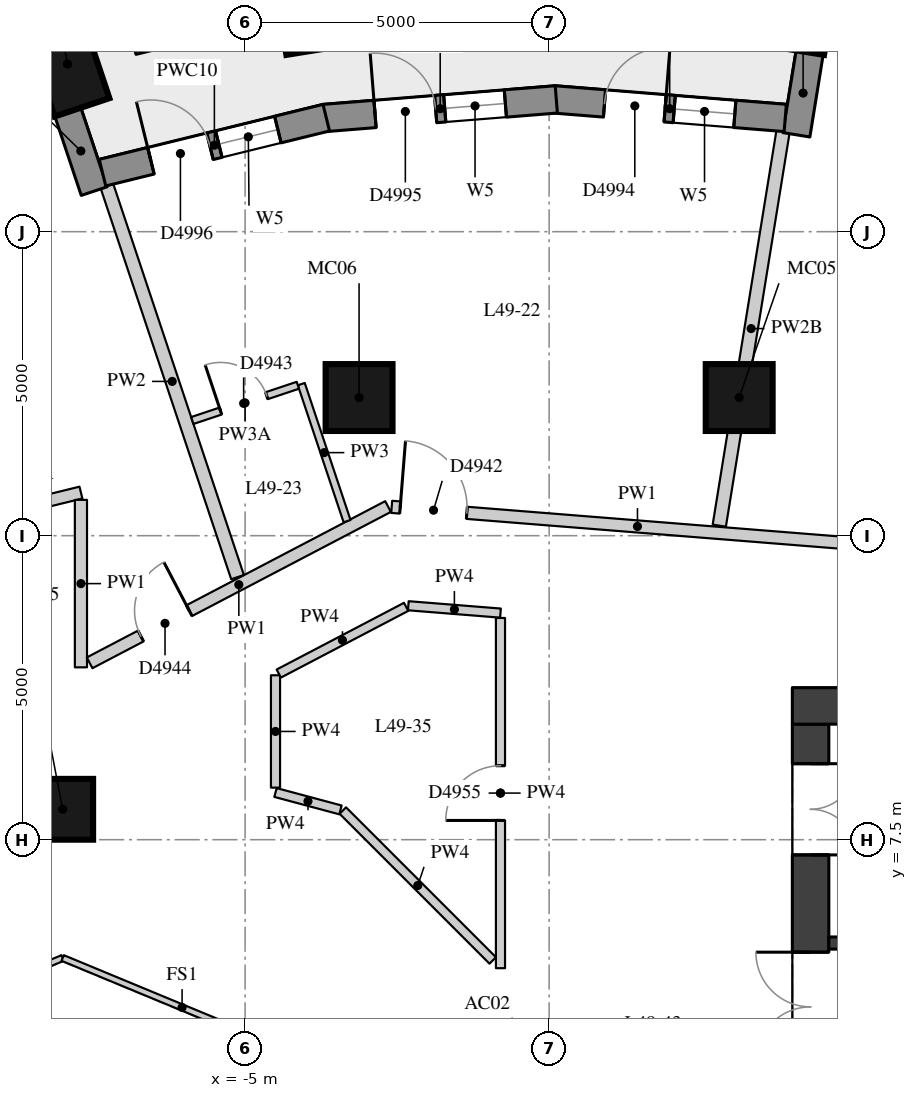
"""IFC4 building model, lengths in metres.
Left out: names, types, materials, properties, quantities, classifications, styles, units other than length and angle.
Written with IfcOpenShell. Run it as: python <this file> out.ifc"""

import sys

from ifc_helpers import new_model, si_unit, direction, frame, frame_2d, origin, origin_2d, place, context, subcontext, project, spatial, rectangle, extrude, element, fill, save


model = new_model("IFC4")
c1 = context("Model", 3, precision=1e-05, world=origin(), true_north=direction((0.0, 1.0)))
c2 = subcontext(c1, "Body", "Model", "MODEL_VIEW")
j1 = project(units=[si_unit("LENGTHUNIT", "METRE"), si_unit("PLANEANGLEUNIT", "RADIAN")], contexts=[c1])
p1 = place(None, origin())
s1 = spatial("IfcSite", under=j1, at=p1, CompositionType="ELEMENT")
p2 = place(p1, origin())
s2 = spatial("IfcBuilding", under=s1, at=p2, CompositionType="ELEMENT")
p3 = place(p2, frame((0.0, 0.0, 174.8)))
s3 = spatial("IfcBuildingStorey", under=s2, at=p3, CompositionType="ELEMENT", Elevation=174.8)
for number, where, z_axis, x_axis in (
    (1, (4.172, 21.224, 0.0), (0.0, 0.0, 1.0), (0.16, 0.987, 0.0)),
    (2, (-3.972, 21.224, 0.0), (0.0, 0.0, 1.0), (-0.16, 0.987, 0.0)),
    (3, (-7.92, 20.256, 0.0), (0.0, 0.0, 1.0), (-0.317, 0.949, 0.0)),
):
    element("IfcColumn", number, at=place(p3, frame(where, z_axis=z_axis, x_axis=x_axis)), inside=s3, PredefinedType="COLUMN", context=c2, shape_type="SweptSolid", body=[
        extrude(rectangle(XDim=1.5, YDim=0.95, at=origin_2d()), origin(), (0.0, 0.0, 1.0), 3.3),
    ])
p4 = place(p3, frame((-8.0, 8.0, 0.0), z_axis=(0.0, 0.0, 1.0), x_axis=(1.0, 0.0, 0.0)))
e4 = element("IfcColumn", 4, at=p4, inside=s3, PredefinedType="COLUMN", context=c2, shape_type="SweptSolid", body=[
    extrude(rectangle(XDim=1.0, YDim=1.0, at=origin_2d()), origin(), (0.0, 0.0, 1.0), 3.3),
])
for number, where, z_axis, x_axis in (
    (5, (3.126, 14.772, 0.0), (0.0, 0.0, 1.0), (1.0, 0.0, 0.0)),
    (6, (-3.126, 14.772, 0.0), (0.0, 0.0, 1.0), (1.0, 0.0, 0.0)),
):
    element("IfcColumn", number, at=place(p3, frame(where, z_axis=z_axis, x_axis=x_axis)), inside=s3, PredefinedType="COLUMN", context=c2, shape_type="SweptSolid", body=[
        extrude(rectangle(XDim=1.1, YDim=1.1, at=origin_2d()), origin(), (0.0, 0.0, 1.0), 3.3),
    ])
p5 = place(p3, frame((4.288, 20.466, 0.0), z_axis=(0.0, 0.0, 1.0), x_axis=(-0.159668705775, -0.987170656166, 0.0)))
e7 = element("IfcWall", 7, at=p5, inside=s3, PredefinedType="SOLIDWALL", context=c2, shape_type="SweptSolid", body=[
    extrude(rectangle(XDim=1.39, YDim=0.45, at=frame_2d((0.695, 0.0))), origin(), (0.0, 0.0, 1.0), 2.57),
])
p6 = place(p3, frame((-7.922, 19.486, 0.0), z_axis=(0.0, 0.0, 1.0), x_axis=(0.316649231286, -0.948542705589, 0.0)))
e8 = element("IfcWall", 8, at=p6, inside=s3, PredefinedType="SOLIDWALL", context=c2, shape_type="SweptSolid", body=[
    extrude(rectangle(XDim=1.39, YDim=0.45, at=frame_2d((0.695, 0.0))), origin(), (0.0, 0.0, 1.0), 3.02),
])
p7 = place(p3, frame((3.883, 19.371, 0.0), z_axis=(0.0, 0.0, 1.0), x_axis=(-0.996792437449, 0.080030223316, 0.0)))
e9 = element("IfcWall", 9, at=p7, inside=s3, PredefinedType="SOLIDWALL", context=c2, shape_type="SweptSolid", body=[
    extrude(rectangle(XDim=3.813, YDim=0.45, at=frame_2d((1.907, 0.0))), origin(), (0.0, 0.0, 1.0), 3.02),
])
p8 = place(p7, frame((0.832, 0.0, 0.4)))
e10 = element("IfcOpeningElement", 10, at=p8, cuts=e9, PredefinedType="OPENING", context=c2, shape_type="SweptSolid", body=[
    extrude(rectangle(XDim=1.0, YDim=1.75, at=frame_2d((0.5, 0.875))), frame((0.0, 0.235, 0.0), z_axis=(0.0, -1.0, 0.0), x_axis=(1.0, 0.0, 0.0)), (0.0, 0.0, 1.0), 0.47),
])
p9 = place(p7, frame((1.982, 0.0, 0.0)))
e11 = element("IfcOpeningElement", 11, at=p9, cuts=e9, PredefinedType="OPENING", context=c2, shape_type="SweptSolid", body=[
    extrude(rectangle(XDim=1.0, YDim=2.15, at=frame_2d((0.5, 1.075))), frame((0.0, 0.235, 0.0), z_axis=(0.0, -1.0, 0.0), x_axis=(1.0, 0.0, 0.0)), (0.0, 0.0, 1.0), 0.47),
])
p10 = place(p3, frame((0.118, 19.676, 0.0), z_axis=(0.0, 0.0, 1.0), x_axis=(-0.996792139022, -0.080033940204, 0.0)))
e12 = element("IfcWall", 12, at=p10, inside=s3, PredefinedType="SOLIDWALL", context=c2, shape_type="SweptSolid", body=[
    extrude(rectangle(XDim=3.831, YDim=0.45, at=frame_2d((1.916, 0.0))), origin(), (0.0, 0.0, 1.0), 3.02),
])
p11 = place(p10, frame((0.841, 0.0, 0.4)))
e13 = element("IfcOpeningElement", 13, at=p11, cuts=e12, PredefinedType="OPENING", context=c2, shape_type="SweptSolid", body=[
    extrude(rectangle(XDim=1.0, YDim=1.75, at=frame_2d((0.5, 0.875))), frame((0.0, 0.235, 0.0), z_axis=(0.0, -1.0, 0.0), x_axis=(1.0, 0.0, 0.0)), (0.0, 0.0, 1.0), 0.47),
])
p12 = place(p10, frame((1.991, 0.0, 0.0)))
e14 = element("IfcOpeningElement", 14, at=p12, cuts=e12, PredefinedType="OPENING", context=c2, shape_type="SweptSolid", body=[
    extrude(rectangle(XDim=1.0, YDim=2.15, at=frame_2d((0.5, 1.075))), frame((0.0, 0.235, 0.0), z_axis=(0.0, -1.0, 0.0), x_axis=(1.0, 0.0, 0.0)), (0.0, 0.0, 1.0), 0.47),
])
p13 = place(p3, frame((-3.665, 19.375, 0.0), z_axis=(0.0, 0.0, 1.0), x_axis=(-0.97110866251, -0.238637728782, 0.0)))
e15 = element("IfcWall", 15, at=p13, inside=s3, PredefinedType="SOLIDWALL", context=c2, shape_type="SweptSolid", body=[
    extrude(rectangle(XDim=3.789, YDim=0.45, at=frame_2d((1.895, 0.0))), origin(), (0.0, 0.0, 1.0), 3.02),
])
p14 = place(p13, frame((0.82, 0.0, 0.4)))
e16 = element("IfcOpeningElement", 16, at=p14, cuts=e15, PredefinedType="OPENING", context=c2, shape_type="SweptSolid", body=[
    extrude(rectangle(XDim=1.0, YDim=1.75, at=frame_2d((0.5, 0.875))), frame((0.0, 0.235, 0.0), z_axis=(0.0, -1.0, 0.0), x_axis=(1.0, 0.0, 0.0)), (0.0, 0.0, 1.0), 0.47),
])
p15 = place(p13, frame((1.97, 0.0, 0.0)))
e17 = element("IfcOpeningElement", 17, at=p15, cuts=e15, PredefinedType="OPENING", context=c2, shape_type="SweptSolid", body=[
    extrude(rectangle(XDim=1.0, YDim=2.15, at=frame_2d((0.5, 1.075))), frame((0.0, 0.235, 0.0), z_axis=(0.0, -1.0, 0.0), x_axis=(1.0, 0.0, 0.0)), (0.0, 0.0, 1.0), 0.47),
])
p16 = place(p3, frame((-5.129, 21.185, 0.0), z_axis=(0.0, 0.0, 1.0), x_axis=(-0.971257007956, -0.238033242419, 0.0)))
e18 = element("IfcWall", 18, at=p16, inside=s3, PredefinedType="USERDEFINED", context=c2, shape_type="SweptSolid", body=[
    extrude(rectangle(XDim=1.8, YDim=0.7, at=frame_2d((0.9, 0.0))), origin(), (0.0, 0.0, 1.0), 0.75),
])
p17 = place(p3, frame((4.3, -9.4, 0.0), z_axis=(0.0, 0.0, 1.0), x_axis=(0.0, 1.0, 0.0)))
e19 = element("IfcWall", 19, at=p17, inside=s3, PredefinedType="SHEAR", context=c2, shape_type="SweptSolid", body=[
    extrude(rectangle(XDim=18.8, YDim=0.6, at=frame_2d((9.4, 0.0))), origin(), (0.0, 0.0, 1.0), 3.02),
])
p18 = place(p17, frame((0.65, 0.0, 0.0)))
e20 = element("IfcOpeningElement", 20, at=p18, cuts=e19, PredefinedType="OPENING", context=c2, shape_type="SweptSolid", body=[
    extrude(rectangle(XDim=1.5, YDim=2.1, at=frame_2d((0.75, 1.05))), frame((0.0, 0.31, 0.0), z_axis=(0.0, -1.0, 0.0), x_axis=(1.0, 0.0, 0.0)), (0.0, 0.0, 1.0), 0.62),
])
p19 = place(p17, frame((3.75, 0.0, 0.0)))
e21 = element("IfcOpeningElement", 21, at=p19, cuts=e19, PredefinedType="OPENING", context=c2, shape_type="SweptSolid", body=[
    extrude(rectangle(XDim=1.8, YDim=2.1, at=frame_2d((0.9, 1.05))), frame((0.0, 0.31, 0.0), z_axis=(0.0, -1.0, 0.0), x_axis=(1.0, 0.0, 0.0)), (0.0, 0.0, 1.0), 0.62),
])
p20 = place(p17, frame((6.25, 0.0, 0.0)))
e22 = element("IfcOpeningElement", 22, at=p20, cuts=e19, PredefinedType="OPENING", context=c2, shape_type="SweptSolid", body=[
    extrude(rectangle(XDim=1.1, YDim=2.1, at=frame_2d((0.55, 1.05))), frame((0.0, 0.31, 0.0), z_axis=(0.0, -1.0, 0.0), x_axis=(1.0, 0.0, 0.0)), (0.0, 0.0, 1.0), 0.62),
])
p21 = place(p17, frame((8.9, 0.0, 0.0)))
e23 = element("IfcOpeningElement", 23, at=p21, cuts=e19, PredefinedType="OPENING", context=c2, shape_type="SweptSolid", body=[
    extrude(rectangle(XDim=1.0, YDim=2.1, at=frame_2d((0.5, 1.05))), frame((0.0, 0.31, 0.0), z_axis=(0.0, -1.0, 0.0), x_axis=(1.0, 0.0, 0.0)), (0.0, 0.0, 1.0), 0.62),
])
p22 = place(p17, frame((11.45, 0.0, 0.0)))
e24 = element("IfcOpeningElement", 24, at=p22, cuts=e19, PredefinedType="OPENING", context=c2, shape_type="SweptSolid", body=[
    extrude(rectangle(XDim=1.1, YDim=2.1, at=frame_2d((0.55, 1.05))), frame((0.0, 0.31, 0.0), z_axis=(0.0, -1.0, 0.0), x_axis=(1.0, 0.0, 0.0)), (0.0, 0.0, 1.0), 0.62),
])
p23 = place(p17, frame((13.25, 0.0, 0.0)))
e25 = element("IfcOpeningElement", 25, at=p23, cuts=e19, PredefinedType="OPENING", context=c2, shape_type="SweptSolid", body=[
    extrude(rectangle(XDim=1.8, YDim=2.1, at=frame_2d((0.9, 1.05))), frame((0.0, 0.31, 0.0), z_axis=(0.0, -1.0, 0.0), x_axis=(1.0, 0.0, 0.0)), (0.0, 0.0, 1.0), 0.62),
])
p24 = place(p17, frame((16.65, 0.0, 0.0)))
e26 = element("IfcOpeningElement", 26, at=p24, cuts=e19, PredefinedType="OPENING", context=c2, shape_type="SweptSolid", body=[
    extrude(rectangle(XDim=1.5, YDim=2.1, at=frame_2d((0.75, 1.05))), frame((0.0, 0.31, 0.0), z_axis=(0.0, -1.0, 0.0), x_axis=(1.0, 0.0, 0.0)), (0.0, 0.0, 1.0), 0.62),
])
p25 = place(p3, frame((4.0, 9.7, 0.0), z_axis=(0.0, 0.0, 1.0), x_axis=(1.0, 0.0, 0.0)))
e27 = element("IfcWall", 27, at=p25, inside=s3, PredefinedType="SHEAR", context=c2, shape_type="SweptSolid", body=[
    extrude(rectangle(XDim=12.0, YDim=0.6, at=frame_2d((6.0, 0.0))), origin(), (0.0, 0.0, 1.0), 3.02),
])
p26 = place(p3, frame((4.6, 5.8, 0.0), z_axis=(0.0, 0.0, 1.0), x_axis=(1.0, 0.0, 0.0)))
e28 = element("IfcWall", 28, at=p26, inside=s3, PredefinedType="SHEAR", context=c2, shape_type="SweptSolid", body=[
    extrude(rectangle(XDim=10.8, YDim=0.2, at=frame_2d((5.4, 0.0))), origin(), (0.0, 0.0, 1.0), 3.02),
])
p27 = place(p26, frame((7.05, 0.0, 0.0)))
e29 = element("IfcOpeningElement", 29, at=p27, cuts=e28, PredefinedType="OPENING", context=c2, shape_type="SweptSolid", body=[
    extrude(rectangle(XDim=1.1, YDim=2.1, at=frame_2d((0.55, 1.05))), frame((0.0, 0.11, 0.0), z_axis=(0.0, -1.0, 0.0), x_axis=(1.0, 0.0, 0.0)), (0.0, 0.0, 1.0), 0.22),
])
p28 = place(p26, frame((9.05, 0.0, 0.0)))
e30 = element("IfcOpeningElement", 30, at=p28, cuts=e28, PredefinedType="OPENING", context=c2, shape_type="SweptSolid", body=[
    extrude(rectangle(XDim=1.1, YDim=2.1, at=frame_2d((0.55, 1.05))), frame((0.0, 0.11, 0.0), z_axis=(0.0, -1.0, 0.0), x_axis=(1.0, 0.0, 0.0)), (0.0, 0.0, 1.0), 0.22),
])
p29 = place(p3, frame((-9.474, 12.773, 0.0), z_axis=(0.0, 0.0, 1.0), x_axis=(0.971086426401, 0.238728197874, 0.0)))
e31 = element("IfcWall", 31, at=p29, inside=s3, PredefinedType="PARTITIONING", context=c2, shape_type="SweptSolid", body=[
    extrude(rectangle(XDim=1.826, YDim=0.2, at=frame_2d((0.913, 0.0))), origin(), (0.0, 0.0, 1.0), 2.57),
])
p30 = place(p3, frame((-7.7, 13.089, 0.0), z_axis=(0.0, 0.0, 1.0), x_axis=(0.0, -1.0, 0.0)))
e32 = element("IfcWall", 32, at=p30, inside=s3, PredefinedType="PARTITIONING", context=c2, shape_type="SweptSolid", body=[
    extrude(rectangle(XDim=2.754, YDim=0.2, at=frame_2d((1.377, 0.0))), origin(), (0.0, 0.0, 1.0), 3.02),
])
p31 = place(p3, frame((-7.557, 10.409, 0.0), z_axis=(0.0, 0.0, 1.0), x_axis=(0.885861719566, 0.463949365565, 0.0)))
e33 = element("IfcWall", 33, at=p31, inside=s3, PredefinedType="PARTITIONING", context=c2, shape_type="SweptSolid", body=[
    extrude(rectangle(XDim=5.541, YDim=0.2, at=frame_2d((2.77, 0.0))), origin(), (0.0, 0.0, 1.0), 3.02),
])
p32 = place(p31, frame((0.95, 0.0, 0.0)))
e34 = element("IfcOpeningElement", 34, at=p32, cuts=e33, PredefinedType="OPENING", context=c2, shape_type="SweptSolid", body=[
    extrude(rectangle(XDim=0.9, YDim=2.1, at=frame_2d((0.45, 1.05))), frame((0.0, 0.11, 0.0), z_axis=(0.0, -1.0, 0.0), x_axis=(1.0, 0.0, 0.0)), (0.0, 0.0, 1.0), 0.22),
])
p33 = place(p3, frame((-2.589, 12.974, 0.0), z_axis=(0.0, 0.0, 1.0), x_axis=(0.996834299001, -0.079507108712, 0.0)))
e35 = element("IfcWall", 35, at=p33, inside=s3, PredefinedType="PARTITIONING", context=c2, shape_type="SweptSolid", body=[
    extrude(rectangle(XDim=8.11, YDim=0.2, at=frame_2d((4.055, 0.0))), origin(), (0.0, 0.0, 1.0), 3.02),
])
p34 = place(p33, frame((0.14, 0.0, 0.0)))
e36 = element("IfcOpeningElement", 36, at=p34, cuts=e35, PredefinedType="OPENING", context=c2, shape_type="SweptSolid", body=[
    extrude(rectangle(XDim=1.1, YDim=2.1, at=frame_2d((0.55, 1.05))), frame((0.0, 0.11, 0.0), z_axis=(0.0, -1.0, 0.0), x_axis=(1.0, 0.0, 0.0)), (0.0, 0.0, 1.0), 0.22),
])
p35 = place(p3, frame((-2.316, 11.348, 0.0), z_axis=(0.0, 0.0, 1.0), x_axis=(0.99682547828, -0.079617622742, 0.0)))
e37 = element("IfcWall", 37, at=p35, inside=s3, PredefinedType="PARTITIONING", context=c2, shape_type="SweptSolid", body=[
    extrude(rectangle(XDim=1.521, YDim=0.15, at=frame_2d((0.76, 0.0))), origin(), (0.0, 0.0, 1.0), 3.02),
])
p36 = place(p3, frame((-0.8, 11.147, 0.0), z_axis=(0.0, 0.0, 1.0), x_axis=(0.0, -1.0, 0.0)))
e38 = element("IfcWall", 38, at=p36, inside=s3, PredefinedType="PARTITIONING", context=c2, shape_type="SweptSolid", body=[
    extrude(rectangle(XDim=5.76, YDim=0.15, at=frame_2d((2.88, 0.0))), origin(), (0.0, 0.0, 1.0), 3.02),
])
p37 = place(p36, frame((2.43, 0.0, 0.0)))
e39 = element("IfcOpeningElement", 39, at=p37, cuts=e38, PredefinedType="OPENING", context=c2, shape_type="SweptSolid", body=[
    extrude(rectangle(XDim=0.9, YDim=2.1, at=frame_2d((0.45, 1.05))), frame((0.0, 0.085, 0.0), z_axis=(0.0, -1.0, 0.0), x_axis=(1.0, 0.0, 0.0)), (0.0, 0.0, 1.0), 0.17),
])
p38 = place(p3, frame((-0.927, 5.514, 0.0), z_axis=(0.0, 0.0, 1.0), x_axis=(-0.707106781187, 0.707106781187, 0.0)))
e40 = element("IfcWall", 40, at=p38, inside=s3, PredefinedType="PARTITIONING", context=c2, shape_type="SweptSolid", body=[
    extrude(rectangle(XDim=3.487, YDim=0.15, at=frame_2d((1.743, 0.0))), origin(), (0.0, 0.0, 1.0), 3.02),
])
p39 = place(p3, frame((-3.432, 7.99, 0.0), z_axis=(0.0, 0.0, 1.0), x_axis=(-0.965900750832, 0.258912609855, 0.0)))
e41 = element("IfcWall", 41, at=p39, inside=s3, PredefinedType="PARTITIONING", context=c2, shape_type="SweptSolid", body=[
    extrude(rectangle(XDim=1.106, YDim=0.15, at=frame_2d((0.553, 0.0))), origin(), (0.0, 0.0, 1.0), 3.02),
])
p40 = place(p3, frame((-4.5, 8.356, 0.0), z_axis=(0.0, 0.0, 1.0), x_axis=(0.0, 1.0, 0.0)))
e42 = element("IfcWall", 42, at=p40, inside=s3, PredefinedType="PARTITIONING", context=c2, shape_type="SweptSolid", body=[
    extrude(rectangle(XDim=1.848, YDim=0.15, at=frame_2d((0.924, 0.0))), origin(), (0.0, 0.0, 1.0), 3.02),
])
p41 = place(p3, frame((-4.447, 10.232, 0.0), z_axis=(0.0, 0.0, 1.0), x_axis=(0.885843659857, 0.463983847016, 0.0)))
e43 = element("IfcWall", 43, at=p41, inside=s3, PredefinedType="PARTITIONING", context=c2, shape_type="SweptSolid", body=[
    extrude(rectangle(XDim=2.365, YDim=0.15, at=frame_2d((1.182, 0.0))), origin(), (0.0, 0.0, 1.0), 3.02),
])
p42 = place(p3, frame((3.847, 19.148, 0.0), z_axis=(0.0, 0.0, 1.0), x_axis=(-0.159670729912, -0.987170328773, 0.0)))
e44 = element("IfcWall", 44, at=p42, inside=s3, PredefinedType="PARTITIONING", context=c2, shape_type="SweptSolid", body=[
    extrude(rectangle(XDim=6.567, YDim=0.22, at=frame_2d((3.284, 0.0))), origin(), (0.0, 0.0, 1.0), 2.57),
])
p43 = place(p3, frame((-7.274, 18.256, 0.0), z_axis=(0.0, 0.0, 1.0), x_axis=(0.316724121691, -0.948517701859, 0.0)))
e45 = element("IfcWall", 45, at=p43, inside=s3, PredefinedType="PARTITIONING", context=c2, shape_type="SweptSolid", body=[
    extrude(rectangle(XDim=6.787, YDim=0.22, at=frame_2d((3.394, 0.0))), origin(), (0.0, 0.0, 1.0), 3.02),
])
p44 = place(p3, frame((-3.323, 12.74, 0.0), z_axis=(0.0, 0.0, 1.0), x_axis=(-0.316720994124, 0.948518746194, 0.0)))
e46 = element("IfcWall", 46, at=p44, inside=s3, PredefinedType="PARTITIONING", context=c2, shape_type="SweptSolid", body=[
    extrude(rectangle(XDim=2.376, YDim=0.12, at=frame_2d((1.188, 0.0))), origin(), (0.0, 0.0, 1.0), 3.02),
])
p45 = place(p3, frame((-4.133, 14.974, 0.0), z_axis=(0.0, 0.0, 1.0), x_axis=(-0.9485230882, -0.31670799035, 0.0)))
e47 = element("IfcWall", 47, at=p45, inside=s3, PredefinedType="PARTITIONING", context=c2, shape_type="SweptSolid", body=[
    extrude(rectangle(XDim=1.83, YDim=0.12, at=frame_2d((0.915, 0.0))), origin(), (0.0, 0.0, 1.0), 2.57),
])
p46 = place(p45, frame((0.54, 0.0, 0.0)))
e48 = element("IfcOpeningElement", 48, at=p46, cuts=e47, PredefinedType="OPENING", context=c2, shape_type="SweptSolid", body=[
    extrude(rectangle(XDim=0.8, YDim=2.1, at=frame_2d((0.4, 1.05))), frame((0.0, 0.07, 0.0), z_axis=(0.0, -1.0, 0.0), x_axis=(1.0, 0.0, 0.0)), (0.0, 0.0, 1.0), 0.14),
])
for number, where, z_axis, x_axis in (
    (49, (-11.927, 3.927, 0.0), (0.0, 0.0, 1.0), (0.924, 0.383, 0.0)),
    (50, (-8.0, 5.554, 0.0), (0.0, 0.0, 1.0), (0.924, -0.383, 0.0)),
):
    element("IfcWall", number, at=place(p3, frame(where, z_axis=z_axis, x_axis=x_axis)), inside=s3, PredefinedType="PARTITIONING", context=c2, shape_type="SweptSolid", body=[
        extrude(rectangle(XDim=4.251, YDim=0.1, at=frame_2d((2.125, 0.0))), origin(), (0.0, 0.0, 1.0), 3.02),
    ])
p47 = place(p8, origin())
e51 = element("IfcWindow", 51, at=p47, inside=s3, PartitioningType="SINGLE_PANEL", PredefinedType="WINDOW", context=c2, shape_type="SweptSolid", body=[
    extrude(rectangle(XDim=1.0, YDim=1.75, at=frame_2d((0.5, 0.875))), frame((0.0, 0.035, 0.0), z_axis=(0.0, -1.0, 0.0), x_axis=(1.0, 0.0, 0.0)), (0.0, 0.0, 1.0), 0.06),
])
fill(e10, e51)
p48 = place(p9, frame((1.0, 0.0, 0.0), z_axis=(0.0, 0.0, 1.0), x_axis=(-1.0, 0.0, 0.0)))
e52 = element("IfcDoor", 52, at=p48, inside=s3, OperationType="SINGLE_SWING_RIGHT", PredefinedType="DOOR", context=c2, shape_type="SweptSolid", body=[
    extrude(rectangle(XDim=1.0, YDim=2.15, at=frame_2d((0.5, 1.075))), frame((0.0, 0.075, 0.0), z_axis=(0.0, -1.0, 0.0), x_axis=(1.0, 0.0, 0.0)), (0.0, 0.0, 1.0), 0.05),
])
fill(e11, e52)
p49 = place(p11, origin())
e53 = element("IfcWindow", 53, at=p49, inside=s3, PartitioningType="SINGLE_PANEL", PredefinedType="WINDOW", context=c2, shape_type="SweptSolid", body=[
    extrude(rectangle(XDim=1.0, YDim=1.75, at=frame_2d((0.5, 0.875))), frame((0.0, 0.035, 0.0), z_axis=(0.0, -1.0, 0.0), x_axis=(1.0, 0.0, 0.0)), (0.0, 0.0, 1.0), 0.06),
])
fill(e13, e53)
p50 = place(p12, frame((1.0, 0.0, 0.0), z_axis=(0.0, 0.0, 1.0), x_axis=(-1.0, 0.0, 0.0)))
e54 = element("IfcDoor", 54, at=p50, inside=s3, OperationType="SINGLE_SWING_LEFT", PredefinedType="DOOR", context=c2, shape_type="SweptSolid", body=[
    extrude(rectangle(XDim=1.0, YDim=2.15, at=frame_2d((0.5, 1.075))), frame((0.0, 0.075, 0.0), z_axis=(0.0, -1.0, 0.0), x_axis=(1.0, 0.0, 0.0)), (0.0, 0.0, 1.0), 0.05),
])
fill(e14, e54)
p51 = place(p14, origin())
e55 = element("IfcWindow", 55, at=p51, inside=s3, PartitioningType="SINGLE_PANEL", PredefinedType="WINDOW", context=c2, shape_type="SweptSolid", body=[
    extrude(rectangle(XDim=1.0, YDim=1.75, at=frame_2d((0.5, 0.875))), frame((0.0, 0.035, 0.0), z_axis=(0.0, -1.0, 0.0), x_axis=(1.0, 0.0, 0.0)), (0.0, 0.0, 1.0), 0.06),
])
fill(e16, e55)
p52 = place(p15, frame((1.0, 0.0, 0.0), z_axis=(0.0, 0.0, 1.0), x_axis=(-1.0, 0.0, 0.0)))
e56 = element("IfcDoor", 56, at=p52, inside=s3, OperationType="SINGLE_SWING_LEFT", PredefinedType="DOOR", context=c2, shape_type="SweptSolid", body=[
    extrude(rectangle(XDim=1.0, YDim=2.15, at=frame_2d((0.5, 1.075))), frame((0.0, 0.075, 0.0), z_axis=(0.0, -1.0, 0.0), x_axis=(1.0, 0.0, 0.0)), (0.0, 0.0, 1.0), 0.05),
])
fill(e17, e56)
p53 = place(p23, origin())
e57 = element("IfcDoor", 57, at=p53, inside=s3, OperationType="DOUBLE_DOOR_SINGLE_SWING", PredefinedType="DOOR", context=c2, shape_type="SweptSolid", body=[
    extrude(rectangle(XDim=1.8, YDim=2.1, at=frame_2d((0.9, 1.05))), frame((0.0, 0.025, 0.0), z_axis=(0.0, -1.0, 0.0), x_axis=(1.0, 0.0, 0.0)), (0.0, 0.0, 1.0), 0.05),
])
fill(e25, e57)
p54 = place(p24, origin())
e58 = element("IfcDoor", 58, at=p54, inside=s3, OperationType="DOUBLE_DOOR_SINGLE_SWING", PredefinedType="DOOR", context=c2, shape_type="SweptSolid", body=[
    extrude(rectangle(XDim=1.5, YDim=2.1, at=frame_2d((0.75, 1.05))), frame((0.0, 0.025, 0.0), z_axis=(0.0, -1.0, 0.0), x_axis=(1.0, 0.0, 0.0)), (0.0, 0.0, 1.0), 0.05),
])
fill(e26, e58)
p55 = place(p34, origin())
e59 = element("IfcDoor", 59, at=p55, inside=s3, OperationType="SINGLE_SWING_LEFT", PredefinedType="DOOR", context=c2, shape_type="SweptSolid", body=[
    extrude(rectangle(XDim=1.1, YDim=2.1, at=frame_2d((0.55, 1.05))), frame((0.0, 0.025, 0.0), z_axis=(0.0, -1.0, 0.0), x_axis=(1.0, 0.0, 0.0)), (0.0, 0.0, 1.0), 0.05),
])
fill(e36, e59)
p56 = place(p46, origin())
e60 = element("IfcDoor", 60, at=p56, inside=s3, OperationType="SINGLE_SWING_LEFT", PredefinedType="DOOR", context=c2, shape_type="SweptSolid", body=[
    extrude(rectangle(XDim=0.8, YDim=2.1, at=frame_2d((0.4, 1.05))), frame((0.0, 0.025, 0.0), z_axis=(0.0, -1.0, 0.0), x_axis=(1.0, 0.0, 0.0)), (0.0, 0.0, 1.0), 0.05),
])
fill(e48, e60)
p57 = place(p32, origin())
e61 = element("IfcDoor", 61, at=p57, inside=s3, OperationType="SINGLE_SWING_RIGHT", PredefinedType="DOOR", context=c2, shape_type="SweptSolid", body=[
    extrude(rectangle(XDim=0.9, YDim=2.1, at=frame_2d((0.45, 1.05))), frame((0.0, 0.025, 0.0), z_axis=(0.0, -1.0, 0.0), x_axis=(1.0, 0.0, 0.0)), (0.0, 0.0, 1.0), 0.05),
])
fill(e34, e61)
p58 = place(p37, origin())
e62 = element("IfcDoor", 62, at=p58, inside=s3, OperationType="SINGLE_SWING_LEFT", PredefinedType="DOOR", context=c2, shape_type="SweptSolid", body=[
    extrude(rectangle(XDim=0.9, YDim=2.1, at=frame_2d((0.45, 1.05))), frame((0.0, 0.025, 0.0), z_axis=(0.0, -1.0, 0.0), x_axis=(1.0, 0.0, 0.0)), (0.0, 0.0, 1.0), 0.05),
])
fill(e39, e62)
save(model, sys.argv[1])
